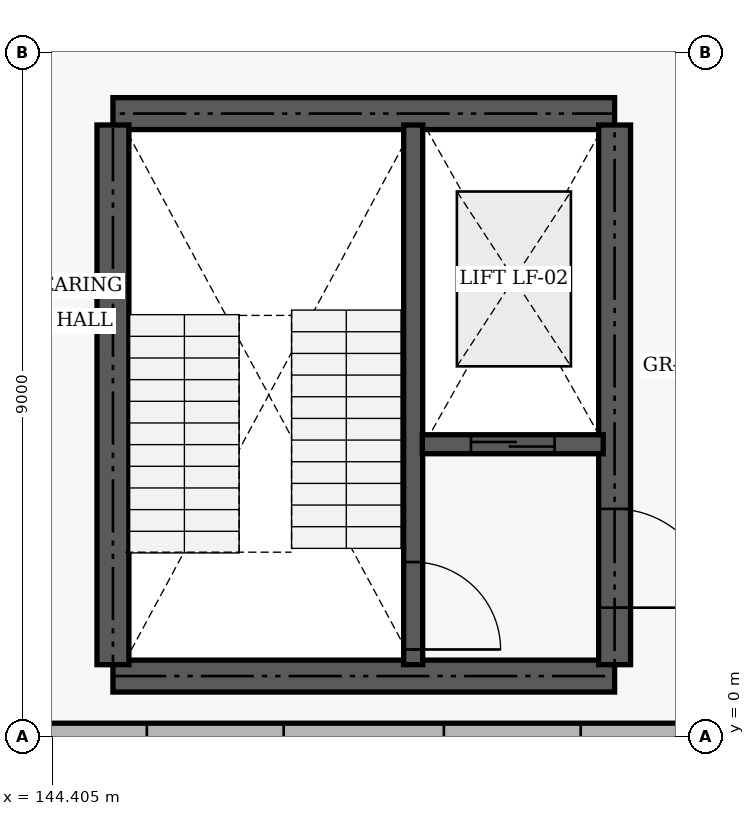
"""IFC4 building model, lengths in metres.
Left out: names, types, materials, properties, quantities, classifications, styles, units other than length and angle.
Written with IfcOpenShell. Run it as: python <this file> out.ifc"""

import sys

from ifc_helpers import new_model, si_unit, direction, frame, frame_2d, origin, place, context, subcontext, project, spatial, rectangle, extrude, element, fill, save


model = new_model("IFC4")
c1 = context("Model", 3, precision=1e-05, world=origin(), true_north=direction((0.0, 1.0)))
c2 = subcontext(c1, "Body", "Model", "MODEL_VIEW")
j1 = project(units=[si_unit("LENGTHUNIT", "METRE"), si_unit("PLANEANGLEUNIT", "RADIAN")], contexts=[c1])
p1 = place(None, origin())
s1 = spatial("IfcSite", under=j1, at=p1, CompositionType="ELEMENT")
p2 = place(p1, origin())
s2 = spatial("IfcBuilding", under=s1, at=p2, CompositionType="ELEMENT")
p3 = place(p2, frame((0.0, 0.0, 9.6)))
s3 = spatial("IfcBuildingStorey", under=s2, at=p3, CompositionType="ELEMENT", Elevation=9.6)
p4 = place(p3, frame((144.06, 0.0, 0.0), z_axis=(0.0, 0.0, 1.0), x_axis=(1.0, 0.0, 0.0)))
e1 = element("IfcWall", 1, at=p4, inside=s3, PredefinedType="SOLIDWALL", context=c2, shape_type="SweptSolid", body=[
    extrude(rectangle(XDim=8.88, YDim=0.36, at=frame_2d((4.44, 0.0))), origin(), (0.0, 0.0, 1.0), 3.25),
])
p5 = place(p4, frame((1.586, 0.0, 0.9)))
e2 = element("IfcOpeningElement", 2, at=p5, cuts=e1, PredefinedType="OPENING", context=c2, shape_type="SweptSolid", body=[
    extrude(rectangle(XDim=1.8, YDim=1.8, at=frame_2d((0.9, 0.9))), frame((0.0, 0.19, 0.0), z_axis=(0.0, -1.0, 0.0), x_axis=(1.0, 0.0, 0.0)), (0.0, 0.0, 1.0), 0.38),
])
p6 = place(p4, frame((5.494, 0.0, 0.9)))
e3 = element("IfcOpeningElement", 3, at=p6, cuts=e1, PredefinedType="OPENING", context=c2, shape_type="SweptSolid", body=[
    extrude(rectangle(XDim=1.8, YDim=1.8, at=frame_2d((0.9, 0.9))), frame((0.0, 0.19, 0.0), z_axis=(0.0, -1.0, 0.0), x_axis=(1.0, 0.0, 0.0)), (0.0, 0.0, 1.0), 0.38),
])
for number, where, z_axis, x_axis in (
    (4, (145.2, 0.8, 0.0), (0.0, 0.0, 1.0), (1.0, 0.0, 0.0)),
    (5, (145.2, 8.2, 0.0), (0.0, 0.0, 1.0), (1.0, 0.0, 0.0)),
):
    element("IfcWall", number, at=place(p3, frame(where, z_axis=z_axis, x_axis=x_axis)), inside=s3, PredefinedType="SHEAR", context=c2, shape_type="SweptSolid", body=[
        extrude(rectangle(XDim=6.6, YDim=0.42, at=frame_2d((3.3, 0.0))), origin(), (0.0, 0.0, 1.0), 3.9),
    ])
p7 = place(p3, frame((145.2, 0.95, 0.0), z_axis=(0.0, 0.0, 1.0), x_axis=(0.0, 1.0, 0.0)))
e6 = element("IfcWall", 6, at=p7, inside=s3, PredefinedType="SHEAR", context=c2, shape_type="SweptSolid", body=[
    extrude(rectangle(XDim=7.1, YDim=0.42, at=frame_2d((3.55, 0.0))), origin(), (0.0, 0.0, 1.0), 3.9),
])
p8 = place(p3, frame((151.8, 0.95, 0.0), z_axis=(0.0, 0.0, 1.0), x_axis=(0.0, 1.0, 0.0)))
e7 = element("IfcWall", 7, at=p8, inside=s3, PredefinedType="SHEAR", context=c2, shape_type="SweptSolid", body=[
    extrude(rectangle(XDim=7.1, YDim=0.42, at=frame_2d((3.55, 0.0))), origin(), (0.0, 0.0, 1.0), 3.9),
])
p9 = place(p8, frame((0.75, 0.0, 0.0)))
e8 = element("IfcOpeningElement", 8, at=p9, cuts=e7, PredefinedType="OPENING", context=c2, shape_type="SweptSolid", body=[
    extrude(rectangle(XDim=1.3, YDim=2.15, at=frame_2d((0.65, 1.075))), frame((0.0, 0.22, 0.0), z_axis=(0.0, -1.0, 0.0), x_axis=(1.0, 0.0, 0.0)), (0.0, 0.0, 1.0), 0.44),
])
p10 = place(p3, frame((149.15, 0.95, 0.0), z_axis=(0.0, 0.0, 1.0), x_axis=(0.0, 1.0, 0.0)))
e9 = element("IfcWall", 9, at=p10, inside=s3, PredefinedType="SHEAR", context=c2, shape_type="SweptSolid", body=[
    extrude(rectangle(XDim=7.1, YDim=0.25, at=frame_2d((3.55, 0.0))), origin(), (0.0, 0.0, 1.0), 3.9),
])
p11 = place(p10, frame((0.2, 0.0, 0.0)))
e10 = element("IfcOpeningElement", 10, at=p11, cuts=e9, PredefinedType="OPENING", context=c2, shape_type="SweptSolid", body=[
    extrude(rectangle(XDim=1.15, YDim=2.15, at=frame_2d((0.575, 1.075))), frame((0.0, 0.135, 0.0), z_axis=(0.0, -1.0, 0.0), x_axis=(1.0, 0.0, 0.0)), (0.0, 0.0, 1.0), 0.27),
])
p12 = place(p3, frame((149.27, 3.85, 0.0), z_axis=(0.0, 0.0, 1.0), x_axis=(1.0, 0.0, 0.0)))
e11 = element("IfcWall", 11, at=p12, inside=s3, PredefinedType="SHEAR", context=c2, shape_type="SweptSolid", body=[
    extrude(rectangle(XDim=2.38, YDim=0.25, at=frame_2d((1.19, 0.0))), origin(), (0.0, 0.0, 1.0), 3.9),
])
p13 = place(p12, frame((0.64, 0.0, 0.0)))
e12 = element("IfcOpeningElement", 12, at=p13, cuts=e11, PredefinedType="OPENING", context=c2, shape_type="SweptSolid", body=[
    extrude(rectangle(XDim=1.1, YDim=2.15, at=frame_2d((0.55, 1.075))), frame((0.0, 0.135, 0.0), z_axis=(0.0, -1.0, 0.0), x_axis=(1.0, 0.0, 0.0)), (0.0, 0.0, 1.0), 0.27),
])
p14 = place(p5, origin())
e13 = element("IfcWindow", 13, at=p14, inside=s3, PartitioningType="SINGLE_PANEL", PredefinedType="WINDOW", context=c2, shape_type="SweptSolid", body=[
    extrude(rectangle(XDim=1.8, YDim=1.8, at=frame_2d((0.9, 0.9))), frame((0.0, 0.03, 0.0), z_axis=(0.0, -1.0, 0.0), x_axis=(1.0, 0.0, 0.0)), (0.0, 0.0, 1.0), 0.06),
])
fill(e2, e13)
p15 = place(p6, origin())
e14 = element("IfcWindow", 14, at=p15, inside=s3, PartitioningType="SINGLE_PANEL", PredefinedType="WINDOW", context=c2, shape_type="SweptSolid", body=[
    extrude(rectangle(XDim=1.8, YDim=1.8, at=frame_2d((0.9, 0.9))), frame((0.0, 0.03, 0.0), z_axis=(0.0, -1.0, 0.0), x_axis=(1.0, 0.0, 0.0)), (0.0, 0.0, 1.0), 0.06),
])
fill(e3, e14)
p16 = place(p9, frame((1.3, 0.0, 0.0), z_axis=(0.0, 0.0, 1.0), x_axis=(-1.0, 0.0, 0.0)))
e15 = element("IfcDoor", 15, at=p16, inside=s3, OperationType="DOUBLE_DOOR_SINGLE_SWING", PredefinedType="DOOR", context=c2, shape_type="SweptSolid", body=[
    extrude(rectangle(XDim=1.3, YDim=2.15, at=frame_2d((0.65, 1.075))), frame((0.0, 0.025, 0.0), z_axis=(0.0, -1.0, 0.0), x_axis=(1.0, 0.0, 0.0)), (0.0, 0.0, 1.0), 0.05),
])
fill(e8, e15)
p17 = place(p11, frame((1.15, 0.0, 0.0), z_axis=(0.0, 0.0, 1.0), x_axis=(-1.0, 0.0, 0.0)))
e16 = element("IfcDoor", 16, at=p17, inside=s3, OperationType="SINGLE_SWING_LEFT", PredefinedType="DOOR", context=c2, shape_type="SweptSolid", body=[
    extrude(rectangle(XDim=1.15, YDim=2.15, at=frame_2d((0.575, 1.075))), frame((0.0, 0.025, 0.0), z_axis=(0.0, -1.0, 0.0), x_axis=(1.0, 0.0, 0.0)), (0.0, 0.0, 1.0), 0.05),
])
fill(e10, e16)
p18 = place(p13, origin())
e17 = element("IfcDoor", 17, at=p18, inside=s3, OperationType="SLIDING_TO_LEFT", PredefinedType="DOOR", context=c2, shape_type="SweptSolid", body=[
    extrude(rectangle(XDim=1.1, YDim=2.15, at=frame_2d((0.55, 1.075))), frame((0.0, 0.025, 0.0), z_axis=(0.0, -1.0, 0.0), x_axis=(1.0, 0.0, 0.0)), (0.0, 0.0, 1.0), 0.05),
])
fill(e12, e17)
save(model, sys.argv[1])
